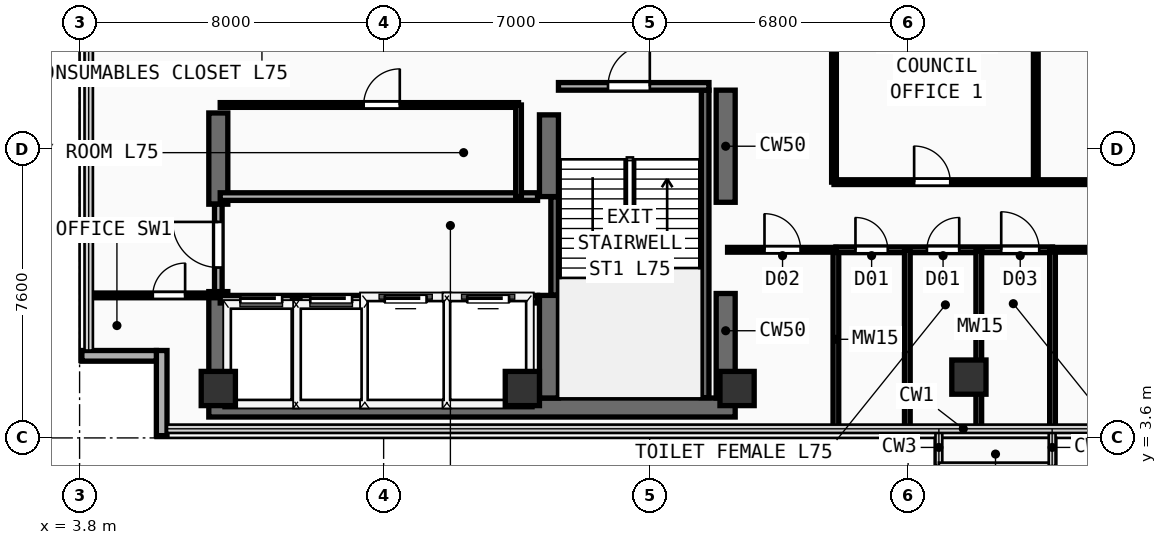
"""IFC4 building model, lengths in metres.
Left out: names, types, materials, properties, quantities, classifications, styles, units other than length and angle.
Written with IfcOpenShell. Run it as: python <this file> out.ifc"""

import sys

from ifc_helpers import new_model, si_unit, direction, frame, frame_2d, origin, origin_2d, place, context, subcontext, project, spatial, rectangle, extrude, element, fill, save


model = new_model("IFC4")
c1 = context("Model", 3, precision=1e-05, world=origin(), true_north=direction((0.0, 1.0)))
c2 = subcontext(c1, "Body", "Model", "MODEL_VIEW")
j1 = project(units=[si_unit("LENGTHUNIT", "METRE"), si_unit("PLANEANGLEUNIT", "RADIAN")], contexts=[c1])
p1 = place(None, origin())
s1 = spatial("IfcSite", under=j1, at=p1, CompositionType="ELEMENT")
p2 = place(p1, origin())
s2 = spatial("IfcBuilding", under=s1, at=p2, CompositionType="ELEMENT")
p3 = place(p2, frame((0.0, 0.0, 293.2)))
s3 = spatial("IfcBuildingStorey", under=s2, at=p3, CompositionType="ELEMENT", Elevation=293.2)
p4 = place(p3, frame((7.2, 4.4, 0.0), z_axis=(0.0, 0.0, 1.0), x_axis=(1.0, 0.0, 0.0)))
e1 = element("IfcWall", 1, at=p4, inside=s3, PredefinedType="SHEAR", context=c2, shape_type="SweptSolid", body=[
    extrude(rectangle(XDim=13.85, YDim=0.5, at=frame_2d((6.925, 0.0))), origin(), (0.0, 0.0, 1.0), 3.56),
])
p5 = place(p3, frame((7.45, 4.65, 0.0), z_axis=(0.0, 0.0, 1.0), x_axis=(0.0, 1.0, 0.0)))
e2 = element("IfcWall", 2, at=p5, inside=s3, PredefinedType="SHEAR", context=c2, shape_type="SweptSolid", body=[
    extrude(rectangle(XDim=2.8, YDim=0.5, at=frame_2d((1.4, 0.0))), origin(), (0.0, 0.0, 1.0), 3.56),
])
p6 = place(p3, frame((7.45, 9.75, 0.0), z_axis=(0.0, 0.0, 1.0), x_axis=(0.0, 1.0, 0.0)))
e3 = element("IfcWall", 3, at=p6, inside=s3, PredefinedType="SHEAR", context=c2, shape_type="SweptSolid", body=[
    extrude(rectangle(XDim=2.4, YDim=0.5, at=frame_2d((1.2, 0.0))), origin(), (0.0, 0.0, 1.0), 3.56),
])
p7 = place(p3, frame((20.8, 4.65, 0.0), z_axis=(0.0, 0.0, 1.0), x_axis=(0.0, 1.0, 0.0)))
e4 = element("IfcWall", 4, at=p7, inside=s3, PredefinedType="SHEAR", context=c2, shape_type="SweptSolid", body=[
    extrude(rectangle(XDim=2.75, YDim=0.5, at=frame_2d((1.375, 0.0))), origin(), (0.0, 0.0, 1.0), 3.56),
])
p8 = place(p3, frame((20.8, 9.8, 0.0), z_axis=(0.0, 0.0, 1.0), x_axis=(0.0, 1.0, 0.0)))
e5 = element("IfcWall", 5, at=p8, inside=s3, PredefinedType="SHEAR", context=c2, shape_type="SweptSolid", body=[
    extrude(rectangle(XDim=2.95, YDim=0.5, at=frame_2d((1.475, 0.0))), origin(), (0.0, 0.0, 1.0), 3.56),
])
p9 = place(p3, frame((16.15, 4.65, 0.0), z_axis=(0.0, 0.0, 1.0), x_axis=(0.0, 1.0, 0.0)))
e6 = element("IfcWall", 6, at=p9, inside=s3, PredefinedType="SHEAR", context=c2, shape_type="SweptSolid", body=[
    extrude(rectangle(XDim=2.7, YDim=0.5, at=frame_2d((1.35, 0.0))), origin(), (0.0, 0.0, 1.0), 3.56),
])
p10 = place(p3, frame((16.15, 9.95, 0.0), z_axis=(0.0, 0.0, 1.0), x_axis=(0.0, 1.0, 0.0)))
e7 = element("IfcWall", 7, at=p10, inside=s3, PredefinedType="SHEAR", context=c2, shape_type="SweptSolid", body=[
    extrude(rectangle(XDim=2.15, YDim=0.5, at=frame_2d((1.075, 0.0))), origin(), (0.0, 0.0, 1.0), 3.56),
])
for number, where, z_axis, x_axis in (
    (8, (7.45, 4.9, 0.0), (0.0, 0.0, 1.0), (1.0, 0.0, 0.0)),
    (9, (15.45, 4.9, 0.0), (0.0, 0.0, 1.0), (1.0, 0.0, 0.0)),
    (10, (21.1, 4.9, 0.0), (0.0, 0.0, 1.0), (1.0, 0.0, 0.0)),
    (11, (27.2, 5.2, 0.0), (0.0, 0.0, 1.0), (1.0, 0.0, 0.0)),
):
    element("IfcColumn", number, at=place(p3, frame(where, z_axis=z_axis, x_axis=x_axis)), inside=s3, PredefinedType="COLUMN", context=c2, shape_type="SweptSolid", body=[
        extrude(rectangle(XDim=0.9, YDim=0.9, at=origin_2d()), origin(), (0.0, 0.0, 1.0), 3.56),
    ])
p11 = place(p3, frame((5.96, 3.66, 0.0), z_axis=(0.0, 0.0, 1.0), x_axis=(0.0, 1.0, 0.0)))
e12 = element("IfcWall", 12, at=p11, inside=s3, PredefinedType="SOLIDWALL", context=c2, shape_type="SweptSolid", body=[
    extrude(rectangle(XDim=2.24, YDim=0.28, at=frame_2d((1.12, 0.0))), origin(), (0.0, 0.0, 1.0), 3.56),
])
p12 = place(p3, frame((3.86, 5.76, 0.0), z_axis=(0.0, 0.0, 1.0), x_axis=(1.0, 0.0, 0.0)))
e13 = element("IfcWall", 13, at=p12, inside=s3, PredefinedType="SOLIDWALL", context=c2, shape_type="SweptSolid", body=[
    extrude(rectangle(XDim=1.96, YDim=0.28, at=frame_2d((0.98, 0.0))), origin(), (0.0, 0.0, 1.0), 3.56),
])
p13 = place(p3, frame((16.3, 7.36, 0.0), z_axis=(0.0, 0.0, 1.0), x_axis=(0.0, 1.0, 0.0)))
e14 = element("IfcWall", 14, at=p13, inside=s3, PredefinedType="SHEAR", context=c2, shape_type="SweptSolid", body=[
    extrude(rectangle(XDim=2.58, YDim=0.2, at=frame_2d((1.29, 0.0))), origin(), (0.0, 0.0, 1.0), 3.56),
])
p14 = place(p3, frame((20.26, 4.66, 0.0), z_axis=(0.0, 0.0, 1.0), x_axis=(0.0, 1.0, 0.0)))
e15 = element("IfcWall", 15, at=p14, inside=s3, PredefinedType="SHEAR", context=c2, shape_type="SweptSolid", body=[
    extrude(rectangle(XDim=8.09, YDim=0.2, at=frame_2d((4.045, 0.0))), origin(), (0.0, 0.0, 1.0), 3.56),
])
p15 = place(p3, frame((16.4, 12.85, 0.0), z_axis=(0.0, 0.0, 1.0), x_axis=(1.0, 0.0, 0.0)))
e16 = element("IfcWall", 16, at=p15, inside=s3, PredefinedType="PARTITIONING", context=c2, shape_type="SweptSolid", body=[
    extrude(rectangle(XDim=3.96, YDim=0.2, at=frame_2d((1.98, 0.0))), origin(), (0.0, 0.0, 1.0), 3.56),
])
p16 = place(p15, frame((1.304, 0.0, 0.0)))
e17 = element("IfcOpeningElement", 17, at=p16, cuts=e16, PredefinedType="OPENING", context=c2, shape_type="SweptSolid", body=[
    extrude(rectangle(XDim=1.1, YDim=2.2, at=frame_2d((0.55, 1.1))), frame((0.0, 0.11, 0.0), z_axis=(0.0, -1.0, 0.0), x_axis=(1.0, 0.0, 0.0)), (0.0, 0.0, 1.0), 0.22),
])
p17 = place(p3, frame((7.5, 7.25, 0.0), z_axis=(0.0, 0.0, 1.0), x_axis=(1.0, 0.0, 0.0)))
e18 = element("IfcWall", 18, at=p17, inside=s3, PredefinedType="PARTITIONING", context=c2, shape_type="SweptSolid", body=[
    extrude(rectangle(XDim=8.35, YDim=0.2, at=frame_2d((4.175, 0.0))), origin(), (0.0, 0.0, 1.0), 3.56),
])
p18 = place(p17, frame((0.53, 0.0, 0.0)))
e19 = element("IfcOpeningElement", 19, at=p18, cuts=e18, PredefinedType="OPENING", context=c2, shape_type="SweptSolid", body=[
    extrude(rectangle(XDim=1.1, YDim=2.2, at=frame_2d((0.55, 1.1))), frame((0.0, 0.11, 0.0), z_axis=(0.0, -1.0, 0.0), x_axis=(1.0, 0.0, 0.0)), (0.0, 0.0, 1.0), 0.22),
])
p19 = place(p17, frame((2.37, 0.0, 0.0)))
e20 = element("IfcOpeningElement", 20, at=p19, cuts=e18, PredefinedType="OPENING", context=c2, shape_type="SweptSolid", body=[
    extrude(rectangle(XDim=1.1, YDim=2.2, at=frame_2d((0.55, 1.1))), frame((0.0, 0.11, 0.0), z_axis=(0.0, -1.0, 0.0), x_axis=(1.0, 0.0, 0.0)), (0.0, 0.0, 1.0), 0.22),
])
p20 = place(p17, frame((4.33, 0.0, 0.0)))
e21 = element("IfcOpeningElement", 21, at=p20, cuts=e18, PredefinedType="OPENING", context=c2, shape_type="SweptSolid", body=[
    extrude(rectangle(XDim=1.1, YDim=2.2, at=frame_2d((0.55, 1.1))), frame((0.0, 0.11, 0.0), z_axis=(0.0, -1.0, 0.0), x_axis=(1.0, 0.0, 0.0)), (0.0, 0.0, 1.0), 0.22),
])
p21 = place(p17, frame((6.5, 0.0, 0.0)))
e22 = element("IfcOpeningElement", 22, at=p21, cuts=e18, PredefinedType="OPENING", context=c2, shape_type="SweptSolid", body=[
    extrude(rectangle(XDim=1.1, YDim=2.2, at=frame_2d((0.55, 1.1))), frame((0.0, 0.11, 0.0), z_axis=(0.0, -1.0, 0.0), x_axis=(1.0, 0.0, 0.0)), (0.0, 0.0, 1.0), 0.22),
])
p22 = place(p3, frame((7.5, 9.95, 0.0), z_axis=(0.0, 0.0, 1.0), x_axis=(1.0, 0.0, 0.0)))
e23 = element("IfcWall", 23, at=p22, inside=s3, PredefinedType="PARTITIONING", context=c2, shape_type="SweptSolid", body=[
    extrude(rectangle(XDim=8.35, YDim=0.2, at=frame_2d((4.175, 0.0))), origin(), (0.0, 0.0, 1.0), 3.56),
])
for number, where, z_axis, x_axis in (
    (24, (9.5, 4.45, 0.0), (0.0, 0.0, 1.0), (0.0, 1.0, 0.0)),
    (25, (11.36, 4.45, 0.0), (0.0, 0.0, 1.0), (0.0, 1.0, 0.0)),
    (26, (13.46, 4.45, 0.0), (0.0, 0.0, 1.0), (0.0, 1.0, 0.0)),
):
    element("IfcWall", number, at=place(p3, frame(where, z_axis=z_axis, x_axis=x_axis)), inside=s3, PredefinedType="PARTITIONING", context=c2, shape_type="SweptSolid", body=[
        extrude(rectangle(XDim=2.8, YDim=0.2, at=frame_2d((1.4, 0.0))), origin(), (0.0, 0.0, 1.0), 3.56),
    ])
p23 = place(p3, frame((7.45, 7.45, 0.0), z_axis=(0.0, 0.0, 1.0), x_axis=(0.0, 1.0, 0.0)))
e27 = element("IfcWall", 27, at=p23, inside=s3, PredefinedType="PARTITIONING", context=c2, shape_type="SweptSolid", body=[
    extrude(rectangle(XDim=2.3, YDim=0.2, at=frame_2d((1.15, 0.0))), origin(), (0.0, 0.0, 1.0), 2.54),
])
p24 = place(p23, frame((0.633, 0.0, 0.0)))
e28 = element("IfcOpeningElement", 28, at=p24, cuts=e27, PredefinedType="OPENING", context=c2, shape_type="SweptSolid", body=[
    extrude(rectangle(XDim=1.2, YDim=2.25, at=frame_2d((0.6, 1.125))), frame((0.0, 0.11, 0.0), z_axis=(0.0, -1.0, 0.0), x_axis=(1.0, 0.0, 0.0)), (0.0, 0.0, 1.0), 0.22),
])
p25 = place(p3, frame((7.5, 12.36, 0.0), z_axis=(0.0, 0.0, 1.0), x_axis=(1.0, 0.0, 0.0)))
e29 = element("IfcWall", 29, at=p25, inside=s3, PredefinedType="PARTITIONING", context=c2, shape_type="SweptSolid", body=[
    extrude(rectangle(XDim=7.85, YDim=0.125, at=frame_2d((3.925, 0.0))), origin(), (0.0, 0.0, 1.0), 3.56),
])
p26 = place(p25, frame((3.775, 0.0, 0.0)))
e30 = element("IfcOpeningElement", 30, at=p26, cuts=e29, PredefinedType="OPENING", context=c2, shape_type="SweptSolid", body=[
    extrude(rectangle(XDim=0.95, YDim=2.15, at=frame_2d((0.475, 1.075))), frame((0.0, 0.073, 0.0), z_axis=(0.0, -1.0, 0.0), x_axis=(1.0, 0.0, 0.0)), (0.0, 0.0, 1.0), 0.145),
])
p27 = place(p3, frame((15.35, 9.95, 0.0), z_axis=(0.0, 0.0, 1.0), x_axis=(0.0, 1.0, 0.0)))
e31 = element("IfcWall", 31, at=p27, inside=s3, PredefinedType="PARTITIONING", context=c2, shape_type="SweptSolid", body=[
    extrude(rectangle(XDim=2.41, YDim=0.15, at=frame_2d((1.205, 0.0))), origin(), (0.0, 0.0, 1.0), 3.56),
])
p28 = place(p3, frame((23.7, 3.84, 0.0), z_axis=(0.0, 0.0, 1.0), x_axis=(0.0, 1.0, 0.0)))
e32 = element("IfcWall", 32, at=p28, inside=s3, PredefinedType="PLUMBINGWALL", context=c2, shape_type="SweptSolid", body=[
    extrude(rectangle(XDim=4.71, YDim=0.15, at=frame_2d((2.355, 0.0))), origin(), (0.0, 0.0, 1.0), 3.56),
])
p29 = place(p3, frame((23.7, 8.55, 0.0), z_axis=(0.0, 0.0, 1.0), x_axis=(1.0, 0.0, 0.0)))
e33 = element("IfcWall", 33, at=p29, inside=s3, PredefinedType="PLUMBINGWALL", context=c2, shape_type="SweptSolid", body=[
    extrude(rectangle(XDim=5.7, YDim=0.15, at=frame_2d((2.85, 0.0))), origin(), (0.0, 0.0, 1.0), 3.56),
])
p30 = place(p29, frame((0.515, 0.0, 0.0)))
e34 = element("IfcOpeningElement", 34, at=p30, cuts=e33, PredefinedType="OPENING", context=c2, shape_type="SweptSolid", body=[
    extrude(rectangle(XDim=0.85, YDim=2.15, at=frame_2d((0.425, 1.075))), frame((0.0, 0.085, 0.0), z_axis=(0.0, -1.0, 0.0), x_axis=(1.0, 0.0, 0.0)), (0.0, 0.0, 1.0), 0.17),
])
p31 = place(p29, frame((2.395, 0.0, 0.0)))
e35 = element("IfcOpeningElement", 35, at=p31, cuts=e33, PredefinedType="OPENING", context=c2, shape_type="SweptSolid", body=[
    extrude(rectangle(XDim=0.85, YDim=2.15, at=frame_2d((0.425, 1.075))), frame((0.0, 0.085, 0.0), z_axis=(0.0, -1.0, 0.0), x_axis=(1.0, 0.0, 0.0)), (0.0, 0.0, 1.0), 0.17),
])
p32 = place(p29, frame((4.35, 0.0, 0.0)))
e36 = element("IfcOpeningElement", 36, at=p32, cuts=e33, PredefinedType="OPENING", context=c2, shape_type="SweptSolid", body=[
    extrude(rectangle(XDim=1.0, YDim=2.2, at=frame_2d((0.5, 1.1))), frame((0.0, 0.085, 0.0), z_axis=(0.0, -1.0, 0.0), x_axis=(1.0, 0.0, 0.0)), (0.0, 0.0, 1.0), 0.17),
])
p33 = place(p3, frame((25.58, 3.84, 0.0), z_axis=(0.0, 0.0, 1.0), x_axis=(0.0, 1.0, 0.0)))
e37 = element("IfcWall", 37, at=p33, inside=s3, PredefinedType="PLUMBINGWALL", context=c2, shape_type="SweptSolid", body=[
    extrude(rectangle(XDim=4.71, YDim=0.15, at=frame_2d((2.355, 0.0))), origin(), (0.0, 0.0, 1.0), 3.56),
])
p34 = place(p3, frame((27.46, 3.84, 0.0), z_axis=(0.0, 0.0, 1.0), x_axis=(0.0, 1.0, 0.0)))
e38 = element("IfcWall", 38, at=p34, inside=s3, PredefinedType="PLUMBINGWALL", context=c2, shape_type="SweptSolid", body=[
    extrude(rectangle(XDim=4.71, YDim=0.15, at=frame_2d((2.355, 0.0))), origin(), (0.0, 0.0, 1.0), 2.798),
])
p35 = place(p3, frame((29.4, 3.84, 0.0), z_axis=(0.0, 0.0, 1.0), x_axis=(0.0, 1.0, 0.0)))
e39 = element("IfcWall", 39, at=p35, inside=s3, PredefinedType="PLUMBINGWALL", context=c2, shape_type="SweptSolid", body=[
    extrude(rectangle(XDim=4.71, YDim=0.15, at=frame_2d((2.355, 0.0))), origin(), (0.0, 0.0, 1.0), 3.56),
])
p36 = place(p3, frame((4.04, 7.35, 0.0), z_axis=(0.0, 0.0, 1.0), x_axis=(1.0, 0.0, 0.0)))
e40 = element("IfcWall", 40, at=p36, inside=s3, PredefinedType="PARTITIONING", context=c2, shape_type="SweptSolid", body=[
    extrude(rectangle(XDim=3.36, YDim=0.125, at=frame_2d((1.68, 0.0))), origin(), (0.0, 0.0, 1.0), 3.56),
])
p37 = place(p36, frame((1.687, 0.0, 0.0)))
e41 = element("IfcOpeningElement", 41, at=p37, cuts=e40, PredefinedType="OPENING", context=c2, shape_type="SweptSolid", body=[
    extrude(rectangle(XDim=0.85, YDim=2.15, at=frame_2d((0.425, 1.075))), frame((0.0, 0.073, 0.0), z_axis=(0.0, -1.0, 0.0), x_axis=(1.0, 0.0, 0.0)), (0.0, 0.0, 1.0), 0.145),
])
p38 = place(p3, frame((20.85, 8.55, 0.0), z_axis=(0.0, 0.0, 1.0), x_axis=(1.0, 0.0, 0.0)))
e42 = element("IfcWall", 42, at=p38, inside=s3, PredefinedType="PARTITIONING", context=c2, shape_type="SweptSolid", body=[
    extrude(rectangle(XDim=2.85, YDim=0.125, at=frame_2d((1.425, 0.0))), origin(), (0.0, 0.0, 1.0), 3.56),
])
p39 = place(p38, frame((0.971, 0.0, 0.0)))
e43 = element("IfcOpeningElement", 43, at=p39, cuts=e42, PredefinedType="OPENING", context=c2, shape_type="SweptSolid", body=[
    extrude(rectangle(XDim=0.95, YDim=2.15, at=frame_2d((0.475, 1.075))), frame((0.0, 0.073, 0.0), z_axis=(0.0, -1.0, 0.0), x_axis=(1.0, 0.0, 0.0)), (0.0, 0.0, 1.0), 0.145),
])
p40 = place(p3, frame((29.4, 8.55, 0.0), z_axis=(0.0, 0.0, 1.0), x_axis=(1.0, 0.0, 0.0)))
e44 = element("IfcWall", 44, at=p40, inside=s3, PredefinedType="PARTITIONING", context=c2, shape_type="SweptSolid", body=[
    extrude(rectangle(XDim=13.2, YDim=0.125, at=frame_2d((6.6, 0.0))), origin(), (0.0, 0.0, 1.0), 3.56),
])
p41 = place(p40, frame((5.72, 0.0, 0.0)))
e45 = element("IfcOpeningElement", 45, at=p41, cuts=e44, PredefinedType="OPENING", context=c2, shape_type="SweptSolid", body=[
    extrude(rectangle(XDim=0.95, YDim=2.15, at=frame_2d((0.475, 1.075))), frame((0.0, 0.073, 0.0), z_axis=(0.0, -1.0, 0.0), x_axis=(1.0, 0.0, 0.0)), (0.0, 0.0, 1.0), 0.145),
])
p42 = place(p3, frame((23.65, 10.33, 0.0), z_axis=(0.0, 0.0, 1.0), x_axis=(0.0, 1.0, 0.0)))
e46 = element("IfcWall", 46, at=p42, inside=s3, PredefinedType="PARTITIONING", context=c2, shape_type="SweptSolid", body=[
    extrude(rectangle(XDim=13.412, YDim=0.125, at=frame_2d((6.706, 0.0))), origin(), (0.0, 0.0, 1.0), 3.56),
])
p43 = place(p3, frame((23.65, 10.33, 0.0), z_axis=(0.0, 0.0, 1.0), x_axis=(1.0, 0.0, 0.0)))
e47 = element("IfcWall", 47, at=p43, inside=s3, PredefinedType="PARTITIONING", context=c2, shape_type="SweptSolid", body=[
    extrude(rectangle(XDim=18.95, YDim=0.125, at=frame_2d((9.475, 0.0))), origin(), (0.0, 0.0, 1.0), 3.56),
])
p44 = place(p43, frame((2.109, 0.0, 0.0)))
e48 = element("IfcOpeningElement", 48, at=p44, cuts=e47, PredefinedType="OPENING", context=c2, shape_type="SweptSolid", body=[
    extrude(rectangle(XDim=0.95, YDim=2.15, at=frame_2d((0.475, 1.075))), frame((0.0, 0.073, 0.0), z_axis=(0.0, -1.0, 0.0), x_axis=(1.0, 0.0, 0.0)), (0.0, 0.0, 1.0), 0.145),
])
p45 = place(p43, frame((8.245, 0.0, 0.0)))
e49 = element("IfcOpeningElement", 49, at=p45, cuts=e47, PredefinedType="OPENING", context=c2, shape_type="SweptSolid", body=[
    extrude(rectangle(XDim=0.95, YDim=2.15, at=frame_2d((0.475, 1.075))), frame((0.0, 0.073, 0.0), z_axis=(0.0, -1.0, 0.0), x_axis=(1.0, 0.0, 0.0)), (0.0, 0.0, 1.0), 0.145),
])
p46 = place(p43, frame((15.065, 0.0, 0.0)))
e50 = element("IfcOpeningElement", 50, at=p46, cuts=e47, PredefinedType="OPENING", context=c2, shape_type="SweptSolid", body=[
    extrude(rectangle(XDim=0.95, YDim=2.15, at=frame_2d((0.475, 1.075))), frame((0.0, 0.073, 0.0), z_axis=(0.0, -1.0, 0.0), x_axis=(1.0, 0.0, 0.0)), (0.0, 0.0, 1.0), 0.145),
])
p47 = place(p3, frame((28.96, 10.33, 0.0), z_axis=(0.0, 0.0, 1.0), x_axis=(0.0, 1.0, 0.0)))
e51 = element("IfcWall", 51, at=p47, inside=s3, PredefinedType="PARTITIONING", context=c2, shape_type="SweptSolid", body=[
    extrude(rectangle(XDim=9.43, YDim=0.125, at=frame_2d((4.715, 0.0))), origin(), (0.0, 0.0, 1.0), 3.56),
])
p48 = place(p16, frame((1.1, 0.0, 0.0), z_axis=(0.0, 0.0, 1.0), x_axis=(-1.0, 0.0, 0.0)))
e52 = element("IfcDoor", 52, at=p48, inside=s3, OperationType="SINGLE_SWING_LEFT", PredefinedType="DOOR", context=c2, shape_type="SweptSolid", body=[
    extrude(rectangle(XDim=1.1, YDim=2.2, at=frame_2d((0.55, 1.1))), frame((0.0, 0.025, 0.0), z_axis=(0.0, -1.0, 0.0), x_axis=(1.0, 0.0, 0.0)), (0.0, 0.0, 1.0), 0.05),
])
fill(e17, e52)
p49 = place(p18, origin())
e53 = element("IfcDoor", 53, at=p49, inside=s3, OperationType="SLIDING_TO_LEFT", PredefinedType="DOOR", context=c2, shape_type="SweptSolid", body=[
    extrude(rectangle(XDim=1.1, YDim=2.2, at=frame_2d((0.55, 1.1))), frame((0.0, 0.025, 0.0), z_axis=(0.0, -1.0, 0.0), x_axis=(1.0, 0.0, 0.0)), (0.0, 0.0, 1.0), 0.05),
])
fill(e19, e53)
p50 = place(p19, origin())
e54 = element("IfcDoor", 54, at=p50, inside=s3, OperationType="SLIDING_TO_LEFT", PredefinedType="DOOR", context=c2, shape_type="SweptSolid", body=[
    extrude(rectangle(XDim=1.1, YDim=2.2, at=frame_2d((0.55, 1.1))), frame((0.0, 0.025, 0.0), z_axis=(0.0, -1.0, 0.0), x_axis=(1.0, 0.0, 0.0)), (0.0, 0.0, 1.0), 0.05),
])
fill(e20, e54)
p51 = place(p20, origin())
e55 = element("IfcDoor", 55, at=p51, inside=s3, OperationType="SLIDING_TO_LEFT", PredefinedType="DOOR", context=c2, shape_type="SweptSolid", body=[
    extrude(rectangle(XDim=1.1, YDim=2.2, at=frame_2d((0.55, 1.1))), frame((0.0, 0.025, 0.0), z_axis=(0.0, -1.0, 0.0), x_axis=(1.0, 0.0, 0.0)), (0.0, 0.0, 1.0), 0.05),
])
fill(e21, e55)
p52 = place(p21, origin())
e56 = element("IfcDoor", 56, at=p52, inside=s3, OperationType="SLIDING_TO_LEFT", PredefinedType="DOOR", context=c2, shape_type="SweptSolid", body=[
    extrude(rectangle(XDim=1.1, YDim=2.2, at=frame_2d((0.55, 1.1))), frame((0.0, 0.025, 0.0), z_axis=(0.0, -1.0, 0.0), x_axis=(1.0, 0.0, 0.0)), (0.0, 0.0, 1.0), 0.05),
])
fill(e22, e56)
p53 = place(p24, frame((1.2, 0.0, 0.0), z_axis=(0.0, 0.0, 1.0), x_axis=(-1.0, 0.0, 0.0)))
e57 = element("IfcDoor", 57, at=p53, inside=s3, OperationType="SINGLE_SWING_LEFT", PredefinedType="DOOR", context=c2, shape_type="SweptSolid", body=[
    extrude(rectangle(XDim=1.2, YDim=2.25, at=frame_2d((0.6, 1.125))), frame((0.0, 0.025, 0.0), z_axis=(0.0, -1.0, 0.0), x_axis=(1.0, 0.0, 0.0)), (0.0, 0.0, 1.0), 0.05),
])
fill(e28, e57)
p54 = place(p26, origin())
e58 = element("IfcDoor", 58, at=p54, inside=s3, OperationType="SINGLE_SWING_RIGHT", PredefinedType="DOOR", context=c2, shape_type="SweptSolid", body=[
    extrude(rectangle(XDim=0.95, YDim=2.15, at=frame_2d((0.475, 1.075))), frame((0.0, 0.025, 0.0), z_axis=(0.0, -1.0, 0.0), x_axis=(1.0, 0.0, 0.0)), (0.0, 0.0, 1.0), 0.05),
])
fill(e30, e58)
p55 = place(p30, origin())
e59 = element("IfcDoor", 59, at=p55, inside=s3, OperationType="SINGLE_SWING_LEFT", PredefinedType="DOOR", context=c2, shape_type="SweptSolid", body=[
    extrude(rectangle(XDim=0.85, YDim=2.15, at=frame_2d((0.425, 1.075))), frame((0.0, 0.025, 0.0), z_axis=(0.0, -1.0, 0.0), x_axis=(1.0, 0.0, 0.0)), (0.0, 0.0, 1.0), 0.05),
])
fill(e34, e59)
p56 = place(p31, origin())
e60 = element("IfcDoor", 60, at=p56, inside=s3, OperationType="SINGLE_SWING_RIGHT", PredefinedType="DOOR", context=c2, shape_type="SweptSolid", body=[
    extrude(rectangle(XDim=0.85, YDim=2.15, at=frame_2d((0.425, 1.075))), frame((0.0, 0.025, 0.0), z_axis=(0.0, -1.0, 0.0), x_axis=(1.0, 0.0, 0.0)), (0.0, 0.0, 1.0), 0.05),
])
fill(e35, e60)
p57 = place(p32, origin())
e61 = element("IfcDoor", 61, at=p57, inside=s3, OperationType="SINGLE_SWING_LEFT", PredefinedType="DOOR", context=c2, shape_type="SweptSolid", body=[
    extrude(rectangle(XDim=1.0, YDim=2.2, at=frame_2d((0.5, 1.1))), frame((0.0, 0.025, 0.0), z_axis=(0.0, -1.0, 0.0), x_axis=(1.0, 0.0, 0.0)), (0.0, 0.0, 1.0), 0.05),
])
fill(e36, e61)
p58 = place(p37, origin())
e62 = element("IfcDoor", 62, at=p58, inside=s3, OperationType="SINGLE_SWING_RIGHT", PredefinedType="DOOR", context=c2, shape_type="SweptSolid", body=[
    extrude(rectangle(XDim=0.85, YDim=2.15, at=frame_2d((0.425, 1.075))), frame((0.0, 0.025, 0.0), z_axis=(0.0, -1.0, 0.0), x_axis=(1.0, 0.0, 0.0)), (0.0, 0.0, 1.0), 0.05),
])
fill(e41, e62)
p59 = place(p39, origin())
e63 = element("IfcDoor", 63, at=p59, inside=s3, OperationType="SINGLE_SWING_LEFT", PredefinedType="DOOR", context=c2, shape_type="SweptSolid", body=[
    extrude(rectangle(XDim=0.95, YDim=2.15, at=frame_2d((0.475, 1.075))), frame((0.0, 0.025, 0.0), z_axis=(0.0, -1.0, 0.0), x_axis=(1.0, 0.0, 0.0)), (0.0, 0.0, 1.0), 0.05),
])
fill(e43, e63)
p60 = place(p44, origin())
e64 = element("IfcDoor", 64, at=p60, inside=s3, OperationType="SINGLE_SWING_LEFT", PredefinedType="DOOR", context=c2, shape_type="SweptSolid", body=[
    extrude(rectangle(XDim=0.95, YDim=2.15, at=frame_2d((0.475, 1.075))), frame((0.0, 0.025, 0.0), z_axis=(0.0, -1.0, 0.0), x_axis=(1.0, 0.0, 0.0)), (0.0, 0.0, 1.0), 0.05),
])
fill(e48, e64)
save(model, sys.argv[1])
